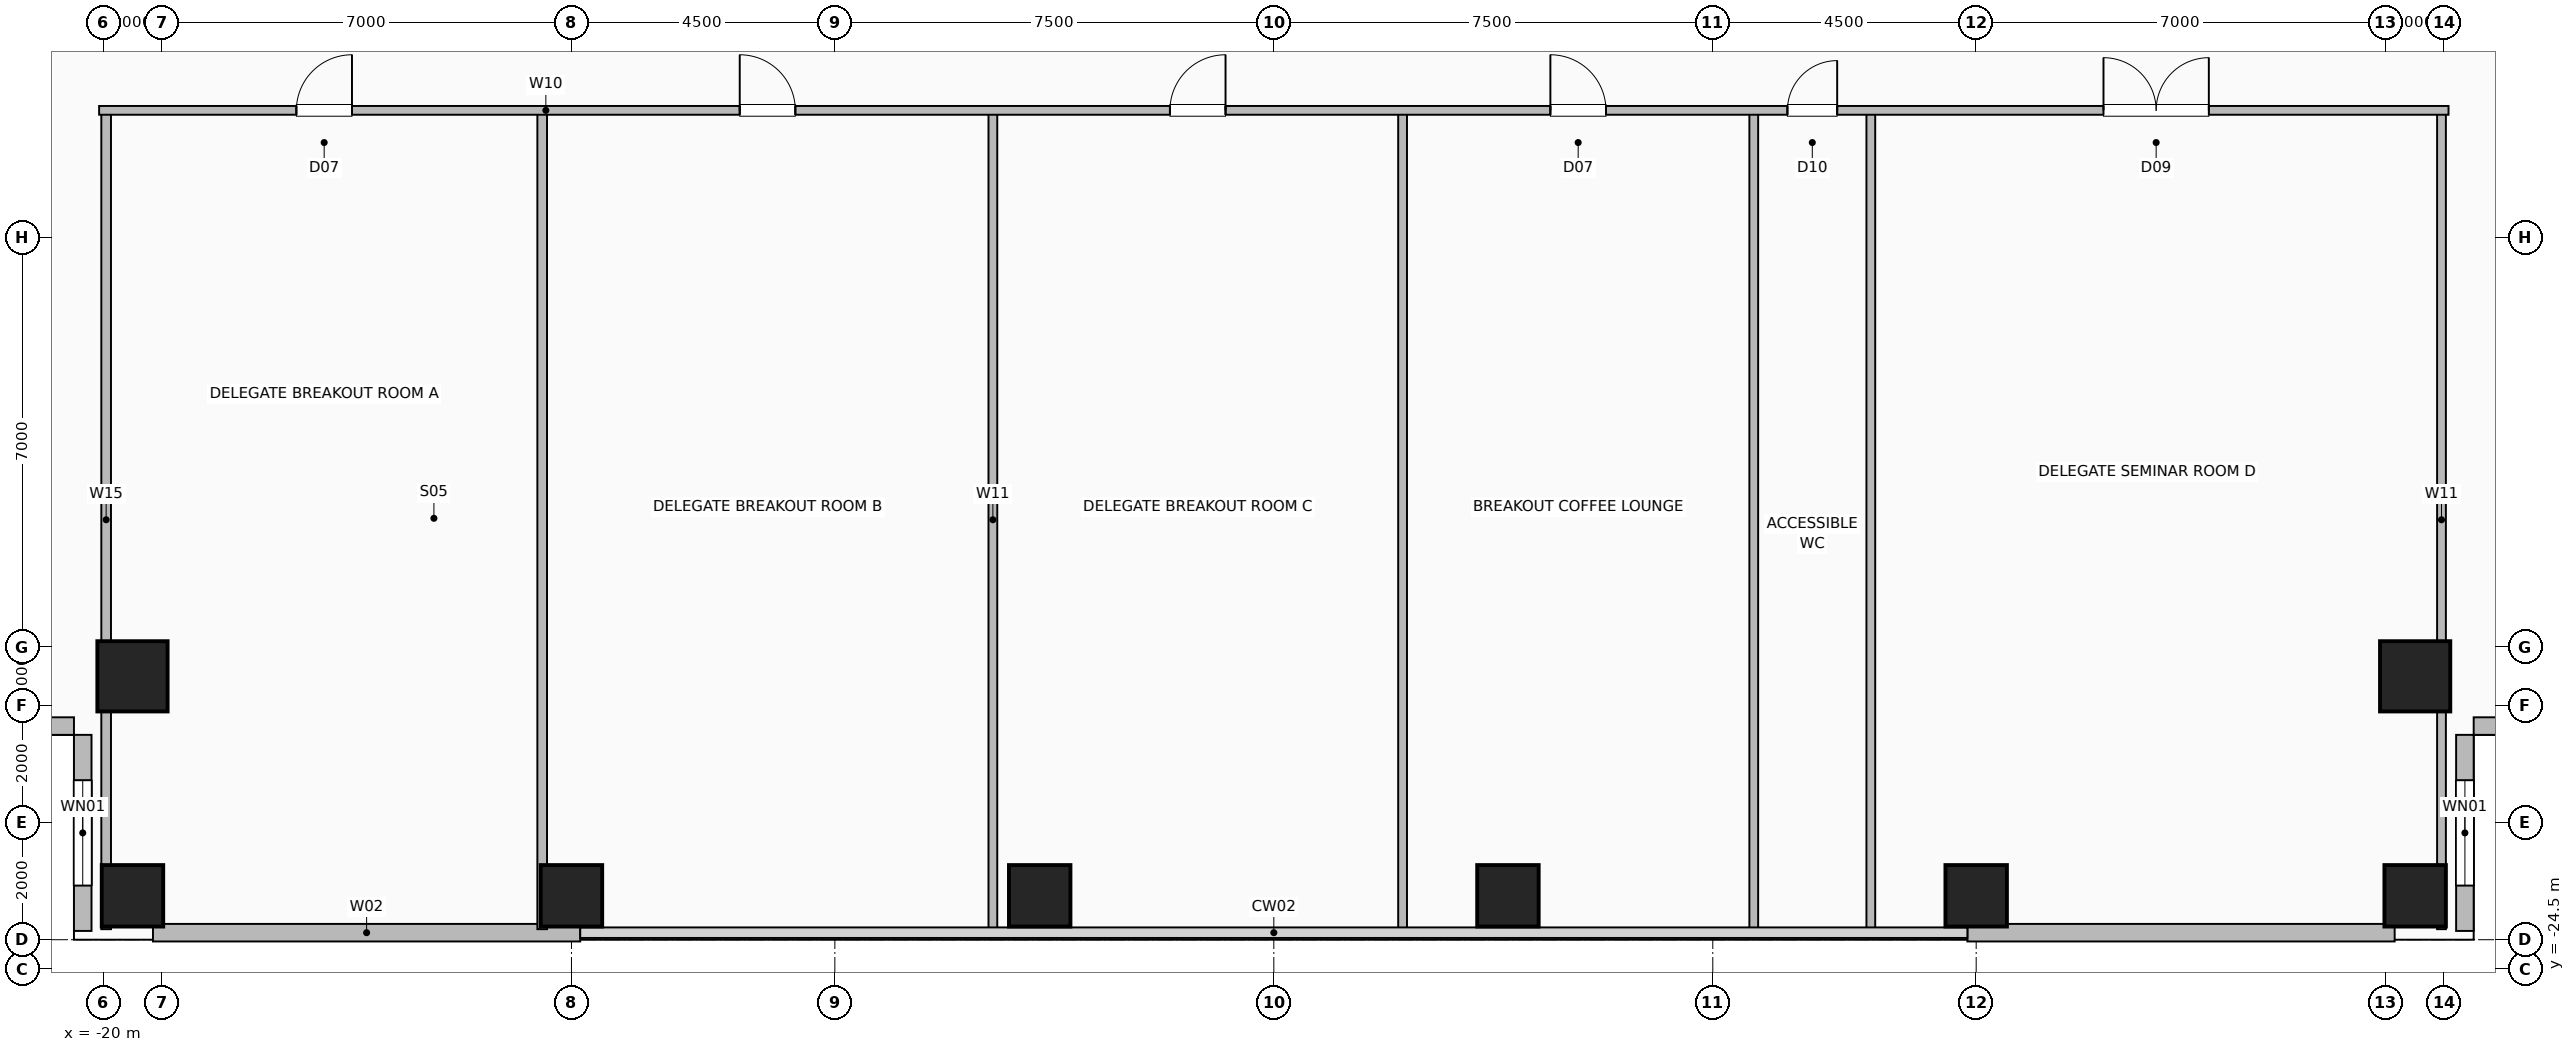
"""IFC4 building model, lengths in metres.
Left out: names, types, materials, properties, quantities, classifications, styles, units other than length and angle.
Written with IfcOpenShell. Run it as: python <this file> out.ifc"""

import sys

from ifc_helpers import new_model, si_unit, direction, frame, frame_2d, origin, origin_2d, place, context, subcontext, project, spatial, rectangle, hollow_rectangle, extrude, element, fill, save


model = new_model("IFC4")
c1 = context("Model", 3, precision=1e-05, world=origin(), true_north=direction((0.0, 1.0)))
c2 = subcontext(c1, "Body", "Model", "MODEL_VIEW")
j1 = project(units=[si_unit("LENGTHUNIT", "METRE"), si_unit("PLANEANGLEUNIT", "RADIAN")], contexts=[c1])
p1 = place(None, origin())
s1 = spatial("IfcSite", under=j1, at=p1, CompositionType="ELEMENT")
p2 = place(p1, origin())
s2 = spatial("IfcBuilding", under=s1, at=p2, CompositionType="ELEMENT")
p3 = place(p2, frame((0.0, 0.0, 44.5)))
s3 = spatial("IfcBuildingStorey", under=s2, at=p3, CompositionType="ELEMENT", Elevation=44.5)
for number, where, z_axis, x_axis in (
    (1, (-19.5, -23.25, 0.0), (0.0, 0.0, 1.0), (1.0, 0.0, 0.0)),
    (2, (-12.0, -23.25, 0.0), (0.0, 0.0, 1.0), (1.0, 0.0, 0.0)),
    (3, (-4.0, -23.25, 0.0), (0.0, 0.0, 1.0), (1.0, 0.0, 0.0)),
    (4, (4.0, -23.25, 0.0), (0.0, 0.0, 1.0), (1.0, 0.0, 0.0)),
    (5, (12.0, -23.25, 0.0), (0.0, 0.0, 1.0), (1.0, 0.0, 0.0)),
    (6, (19.5, -23.25, 0.0), (0.0, 0.0, 1.0), (1.0, 0.0, 0.0)),
):
    element("IfcColumn", number, at=place(p3, frame(where, z_axis=z_axis, x_axis=x_axis)), inside=s3, PredefinedType="COLUMN", context=c2, shape_type="SweptSolid", body=[
        extrude(hollow_rectangle(XDim=1.05, YDim=1.05, WallThickness=0.05, at=origin_2d()), origin(), (0.0, 0.0, 1.0), 3.5),
    ])
for number, where, z_axis, x_axis in (
    (7, (-19.5, -19.5, 0.0), (0.0, 0.0, 1.0), (1.0, 0.0, 0.0)),
    (8, (19.5, -19.5, 0.0), (0.0, 0.0, 1.0), (1.0, 0.0, 0.0)),
):
    element("IfcColumn", number, at=place(p3, frame(where, z_axis=z_axis, x_axis=x_axis)), inside=s3, PredefinedType="COLUMN", context=c2, shape_type="SweptSolid", body=[
        extrude(hollow_rectangle(XDim=1.2, YDim=1.2, WallThickness=0.055, at=origin_2d()), origin(), (0.0, 0.0, 1.0), 3.5),
    ])
for number, where, z_axis, x_axis in (
    (9, (-19.15, -23.88, 0.0), (0.0, 0.0, 1.0), (1.0, 0.0, 0.0)),
    (10, (11.85, -23.88, 0.0), (0.0, 0.0, 1.0), (1.0, 0.0, 0.0)),
):
    element("IfcWall", number, at=place(p3, frame(where, z_axis=z_axis, x_axis=x_axis)), inside=s3, PredefinedType="SOLIDWALL", context=c2, shape_type="SweptSolid", body=[
        extrude(rectangle(XDim=7.3, YDim=0.3, at=frame_2d((3.65, 0.0))), origin(), (0.0, 0.0, 1.0), 3.25),
    ])
p4 = place(p3, frame((-20.35, -23.85, 0.0), z_axis=(0.0, 0.0, 1.0), x_axis=(0.0, 1.0, 0.0)))
e11 = element("IfcWall", 11, at=p4, inside=s3, PredefinedType="SOLIDWALL", context=c2, shape_type="SweptSolid", body=[
    extrude(rectangle(XDim=3.35, YDim=0.3, at=frame_2d((1.675, 0.0))), origin(), (0.0, 0.0, 1.0), 3.25),
])
p5 = place(p4, frame((0.775, 0.0, 0.9)))
e12 = element("IfcOpeningElement", 12, at=p5, cuts=e11, PredefinedType="OPENING", context=c2, shape_type="SweptSolid", body=[
    extrude(rectangle(XDim=1.8, YDim=1.8, at=frame_2d((0.9, 0.9))), frame((0.0, 0.16, 0.0), z_axis=(0.0, -1.0, 0.0), x_axis=(1.0, 0.0, 0.0)), (0.0, 0.0, 1.0), 0.32),
])
p6 = place(p3, frame((-23.85, -20.35, 0.0), z_axis=(0.0, 0.0, 1.0), x_axis=(1.0, 0.0, 0.0)))
e13 = element("IfcWall", 13, at=p6, inside=s3, PredefinedType="SOLIDWALL", context=c2, shape_type="SweptSolid", body=[
    extrude(rectangle(XDim=3.35, YDim=0.3, at=frame_2d((1.675, 0.0))), origin(), (0.0, 0.0, 1.0), 3.25),
])
p7 = place(p3, frame((20.35, -23.85, 0.0), z_axis=(0.0, 0.0, 1.0), x_axis=(0.0, 1.0, 0.0)))
e14 = element("IfcWall", 14, at=p7, inside=s3, PredefinedType="SOLIDWALL", context=c2, shape_type="SweptSolid", body=[
    extrude(rectangle(XDim=3.35, YDim=0.3, at=frame_2d((1.675, 0.0))), origin(), (0.0, 0.0, 1.0), 3.25),
])
p8 = place(p7, frame((0.775, 0.0, 0.9)))
e15 = element("IfcOpeningElement", 15, at=p8, cuts=e14, PredefinedType="OPENING", context=c2, shape_type="SweptSolid", body=[
    extrude(rectangle(XDim=1.8, YDim=1.8, at=frame_2d((0.9, 0.9))), frame((0.0, 0.16, 0.0), z_axis=(0.0, -1.0, 0.0), x_axis=(1.0, 0.0, 0.0)), (0.0, 0.0, 1.0), 0.32),
])
p9 = place(p3, frame((23.85, -20.35, 0.0), z_axis=(0.0, 0.0, 1.0), x_axis=(-1.0, 0.0, 0.0)))
e16 = element("IfcWall", 16, at=p9, inside=s3, PredefinedType="SOLIDWALL", context=c2, shape_type="SweptSolid", body=[
    extrude(rectangle(XDim=3.35, YDim=0.3, at=frame_2d((1.675, 0.0))), origin(), (0.0, 0.0, 1.0), 3.25),
])
for number, where, z_axis, x_axis in (
    (17, (-19.95, -23.82, 0.0), (0.0, 0.0, 1.0), (0.0, 1.0, 0.0)),
    (18, (-12.5, -23.82, 0.0), (0.0, 0.0, 1.0), (0.0, 1.0, 0.0)),
):
    element("IfcWall", number, at=place(p3, frame(where, z_axis=z_axis, x_axis=x_axis)), inside=s3, PredefinedType="PLUMBINGWALL", context=c2, shape_type="SweptSolid", body=[
        extrude(rectangle(XDim=13.99, YDim=0.165, at=frame_2d((6.995, 0.0))), origin(), (0.0, 0.0, 1.0), 3.25),
    ])
p10 = place(p3, frame((-4.8, -23.82, 0.0), z_axis=(0.0, 0.0, 1.0), x_axis=(0.0, 1.0, 0.0)))
e19 = element("IfcWall", 19, at=p10, inside=s3, PredefinedType="PARTITIONING", context=c2, shape_type="SweptSolid", body=[
    extrude(rectangle(XDim=13.99, YDim=0.15, at=frame_2d((6.995, 0.0))), origin(), (0.0, 0.0, 1.0), 2.818),
])
for number, where, z_axis, x_axis in (
    (20, (2.2, -23.82, 0.0), (0.0, 0.0, 1.0), (0.0, 1.0, 0.0)),
    (21, (8.2, -23.82, 0.0), (0.0, 0.0, 1.0), (0.0, 1.0, 0.0)),
    (22, (10.2, -23.82, 0.0), (0.0, 0.0, 1.0), (0.0, 1.0, 0.0)),
    (23, (19.95, -23.82, 0.0), (0.0, 0.0, 1.0), (0.0, 1.0, 0.0)),
):
    element("IfcWall", number, at=place(p3, frame(where, z_axis=z_axis, x_axis=x_axis)), inside=s3, PredefinedType="PARTITIONING", context=c2, shape_type="SweptSolid", body=[
        extrude(rectangle(XDim=13.99, YDim=0.15, at=frame_2d((6.995, 0.0))), origin(), (0.0, 0.0, 1.0), 3.25),
    ])
p11 = place(p3, frame((-20.07, -9.83, 0.0), z_axis=(0.0, 0.0, 1.0), x_axis=(1.0, 0.0, 0.0)))
e24 = element("IfcWall", 24, at=p11, inside=s3, PredefinedType="PARTITIONING", context=c2, shape_type="SweptSolid", body=[
    extrude(rectangle(XDim=40.14, YDim=0.15, at=frame_2d((20.07, 0.0))), origin(), (0.0, 0.0, 1.0), 3.25),
])
p12 = place(p11, frame((3.37, 0.0, 0.0)))
e25 = element("IfcOpeningElement", 25, at=p12, cuts=e24, PredefinedType="OPENING", context=c2, shape_type="SweptSolid", body=[
    extrude(rectangle(XDim=0.95, YDim=2.06, at=frame_2d((0.475, 1.03))), frame((0.0, 0.085, 0.0), z_axis=(0.0, -1.0, 0.0), x_axis=(1.0, 0.0, 0.0)), (0.0, 0.0, 1.0), 0.17),
])
p13 = place(p11, frame((10.945, 0.0, 0.0)))
e26 = element("IfcOpeningElement", 26, at=p13, cuts=e24, PredefinedType="OPENING", context=c2, shape_type="SweptSolid", body=[
    extrude(rectangle(XDim=0.95, YDim=2.06, at=frame_2d((0.475, 1.03))), frame((0.0, 0.085, 0.0), z_axis=(0.0, -1.0, 0.0), x_axis=(1.0, 0.0, 0.0)), (0.0, 0.0, 1.0), 0.17),
])
p14 = place(p11, frame((18.295, 0.0, 0.0)))
e27 = element("IfcOpeningElement", 27, at=p14, cuts=e24, PredefinedType="OPENING", context=c2, shape_type="SweptSolid", body=[
    extrude(rectangle(XDim=0.95, YDim=2.06, at=frame_2d((0.475, 1.03))), frame((0.0, 0.085, 0.0), z_axis=(0.0, -1.0, 0.0), x_axis=(1.0, 0.0, 0.0)), (0.0, 0.0, 1.0), 0.17),
])
p15 = place(p11, frame((24.795, 0.0, 0.0)))
e28 = element("IfcOpeningElement", 28, at=p15, cuts=e24, PredefinedType="OPENING", context=c2, shape_type="SweptSolid", body=[
    extrude(rectangle(XDim=0.95, YDim=2.06, at=frame_2d((0.475, 1.03))), frame((0.0, 0.085, 0.0), z_axis=(0.0, -1.0, 0.0), x_axis=(1.0, 0.0, 0.0)), (0.0, 0.0, 1.0), 0.17),
])
p16 = place(p11, frame((28.845, 0.0, 0.0)))
e29 = element("IfcOpeningElement", 29, at=p16, cuts=e24, PredefinedType="OPENING", context=c2, shape_type="SweptSolid", body=[
    extrude(rectangle(XDim=0.85, YDim=2.05, at=frame_2d((0.425, 1.025))), frame((0.0, 0.085, 0.0), z_axis=(0.0, -1.0, 0.0), x_axis=(1.0, 0.0, 0.0)), (0.0, 0.0, 1.0), 0.17),
])
p17 = place(p11, frame((34.245, 0.0, 0.0)))
e30 = element("IfcOpeningElement", 30, at=p17, cuts=e24, PredefinedType="OPENING", context=c2, shape_type="SweptSolid", body=[
    extrude(rectangle(XDim=1.8, YDim=2.08, at=frame_2d((0.9, 1.04))), frame((0.0, 0.085, 0.0), z_axis=(0.0, -1.0, 0.0), x_axis=(1.0, 0.0, 0.0)), (0.0, 0.0, 1.0), 0.17),
])
p18 = place(p5, origin())
e31 = element("IfcWindow", 31, at=p18, inside=s3, PartitioningType="SINGLE_PANEL", PredefinedType="WINDOW", context=c2, shape_type="SweptSolid", body=[
    extrude(rectangle(XDim=1.8, YDim=1.8, at=frame_2d((0.9, 0.9))), frame((0.0, 0.03, 0.0), z_axis=(0.0, -1.0, 0.0), x_axis=(1.0, 0.0, 0.0)), (0.0, 0.0, 1.0), 0.06),
])
fill(e12, e31)
p19 = place(p8, origin())
e32 = element("IfcWindow", 32, at=p19, inside=s3, PartitioningType="SINGLE_PANEL", PredefinedType="WINDOW", context=c2, shape_type="SweptSolid", body=[
    extrude(rectangle(XDim=1.8, YDim=1.8, at=frame_2d((0.9, 0.9))), frame((0.0, 0.03, 0.0), z_axis=(0.0, -1.0, 0.0), x_axis=(1.0, 0.0, 0.0)), (0.0, 0.0, 1.0), 0.06),
])
fill(e15, e32)
p20 = place(p12, origin())
e33 = element("IfcDoor", 33, at=p20, inside=s3, OperationType="SINGLE_SWING_RIGHT", PredefinedType="DOOR", context=c2, shape_type="SweptSolid", body=[
    extrude(rectangle(XDim=0.95, YDim=2.06, at=frame_2d((0.475, 1.03))), frame((0.0, 0.025, 0.0), z_axis=(0.0, -1.0, 0.0), x_axis=(1.0, 0.0, 0.0)), (0.0, 0.0, 1.0), 0.05),
])
fill(e25, e33)
p21 = place(p13, origin())
e34 = element("IfcDoor", 34, at=p21, inside=s3, OperationType="SINGLE_SWING_LEFT", PredefinedType="DOOR", context=c2, shape_type="SweptSolid", body=[
    extrude(rectangle(XDim=0.95, YDim=2.06, at=frame_2d((0.475, 1.03))), frame((0.0, 0.025, 0.0), z_axis=(0.0, -1.0, 0.0), x_axis=(1.0, 0.0, 0.0)), (0.0, 0.0, 1.0), 0.05),
])
fill(e26, e34)
p22 = place(p14, origin())
e35 = element("IfcDoor", 35, at=p22, inside=s3, OperationType="SINGLE_SWING_RIGHT", PredefinedType="DOOR", context=c2, shape_type="SweptSolid", body=[
    extrude(rectangle(XDim=0.95, YDim=2.06, at=frame_2d((0.475, 1.03))), frame((0.0, 0.025, 0.0), z_axis=(0.0, -1.0, 0.0), x_axis=(1.0, 0.0, 0.0)), (0.0, 0.0, 1.0), 0.05),
])
fill(e27, e35)
p23 = place(p15, origin())
e36 = element("IfcDoor", 36, at=p23, inside=s3, OperationType="SINGLE_SWING_LEFT", PredefinedType="DOOR", context=c2, shape_type="SweptSolid", body=[
    extrude(rectangle(XDim=0.95, YDim=2.06, at=frame_2d((0.475, 1.03))), frame((0.0, 0.025, 0.0), z_axis=(0.0, -1.0, 0.0), x_axis=(1.0, 0.0, 0.0)), (0.0, 0.0, 1.0), 0.05),
])
fill(e28, e36)
p24 = place(p16, origin())
e37 = element("IfcDoor", 37, at=p24, inside=s3, OperationType="SINGLE_SWING_RIGHT", PredefinedType="DOOR", context=c2, shape_type="SweptSolid", body=[
    extrude(rectangle(XDim=0.85, YDim=2.05, at=frame_2d((0.425, 1.025))), frame((0.0, 0.025, 0.0), z_axis=(0.0, -1.0, 0.0), x_axis=(1.0, 0.0, 0.0)), (0.0, 0.0, 1.0), 0.05),
])
fill(e29, e37)
p25 = place(p17, origin())
e38 = element("IfcDoor", 38, at=p25, inside=s3, OperationType="DOUBLE_DOOR_SINGLE_SWING", PredefinedType="DOOR", context=c2, shape_type="SweptSolid", body=[
    extrude(rectangle(XDim=1.8, YDim=2.08, at=frame_2d((0.9, 1.04))), frame((0.0, 0.025, 0.0), z_axis=(0.0, -1.0, 0.0), x_axis=(1.0, 0.0, 0.0)), (0.0, 0.0, 1.0), 0.05),
])
fill(e30, e38)
save(model, sys.argv[1])
